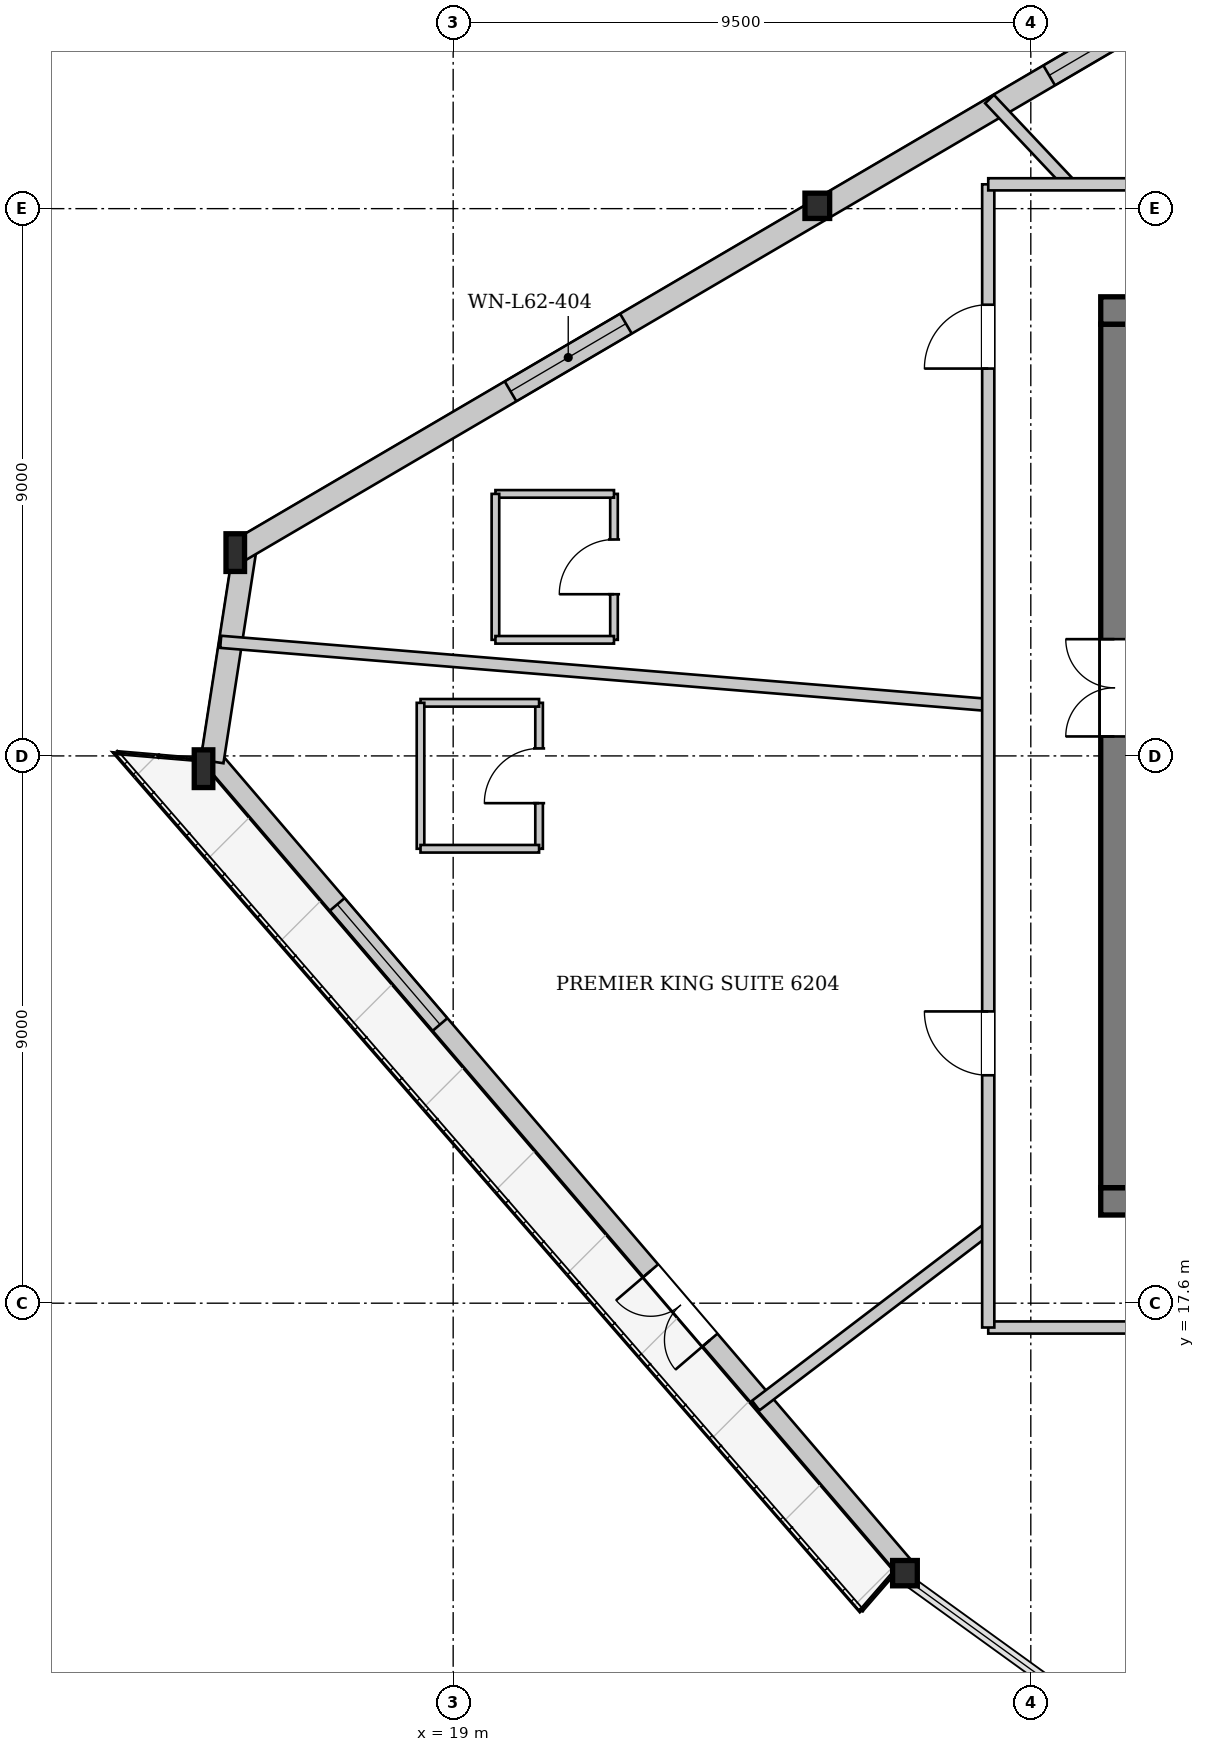
"""IFC4 building model, lengths in metres.
Left out: names, types, materials, properties, quantities, classifications, styles, units other than length and angle.
Written with IfcOpenShell. Run it as: python <this file> out.ifc"""

import sys

from ifc_helpers import new_model, si_unit, direction, frame, frame_2d, origin, origin_2d, place, context, subcontext, project, spatial, rectangle, i_section, extrude, source, transform, mapped, element, fill, save


model = new_model("IFC4")
c1 = context("Model", 3, precision=1e-05, world=origin(), true_north=direction((0.0, 1.0)))
c2 = subcontext(c1, "Body", "Model", "MODEL_VIEW")
j1 = project(units=[si_unit("LENGTHUNIT", "METRE"), si_unit("PLANEANGLEUNIT", "RADIAN")], contexts=[c1])
p1 = place(None, origin())
s1 = spatial("IfcSite", under=j1, at=p1, CompositionType="ELEMENT")
p2 = place(p1, origin())
s2 = spatial("IfcBuilding", under=s1, at=p2, CompositionType="ELEMENT")
p3 = place(p2, frame((0.0, 0.0, 234.5)))
s3 = spatial("IfcBuildingStorey", under=s2, at=p3, CompositionType="ELEMENT", Elevation=234.5)
m1 = source(origin(), c2, "Body", "SweptSolid", [
    extrude(i_section(OverallWidth=0.406, OverallDepth=0.416, WebThickness=0.027, FlangeThickness=0.042, at=origin_2d()), origin(), (0.0, 0.0, 1.0), 3.45),
])
p4 = place(p3, frame((25.031, 35.8, 0.0), z_axis=(-0.024769494454, -0.088887100096, 0.995733677035), x_axis=(0.963297826422, -0.26843490386, 0.0)))
e1 = element("IfcColumn", 1, at=p4, inside=s3, PredefinedType="COLUMN", context=c2, shape_type="MappedRepresentation", body=[
    mapped(m1, transform((0.0, 0.0, 0.0), x_axis=(1.0, 0.0, 0.0), y_axis=(0.0, 1.0, 0.0), z_axis=(0.0, 0.0, 1.0), scale=1.0)),
])
m2 = source(origin(), c2, "Body", "SweptSolid", [
    extrude(i_section(OverallWidth=0.305, OverallDepth=0.62, WebThickness=0.021, FlangeThickness=0.04, at=origin_2d()), origin(), (0.0, 0.0, 1.0), 3.461),
])
p5 = place(p3, frame((15.406, 30.154, 0.0), z_axis=(0.005925625023, -0.121757485595, 0.99254219138), x_axis=(0.998817839746, 0.048609906453, 0.0)))
e2 = element("IfcColumn", 2, at=p5, inside=s3, PredefinedType="COLUMN", context=c2, shape_type="MappedRepresentation", body=[
    mapped(m2, transform((0.0, 0.0, 0.0), x_axis=(1.0, 0.0, 0.0), y_axis=(0.0, 1.0, 0.0), z_axis=(0.0, 0.0, 1.0), scale=1.0)),
])
m3 = source(origin(), c2, "Body", "SweptSolid", [
    extrude(i_section(OverallWidth=0.305, OverallDepth=0.62, WebThickness=0.021, FlangeThickness=0.04, at=origin_2d()), origin(), (0.0, 0.0, 1.0), 3.449),
])
p6 = place(p3, frame((14.846, 26.537, 0.0), z_axis=(0.027818617963, -0.085508627226, 0.995948994259), x_axis=(0.950941466299, 0.309370857827, 0.0)))
e3 = element("IfcColumn", 3, at=p6, inside=s3, PredefinedType="COLUMN", context=c2, shape_type="MappedRepresentation", body=[
    mapped(m3, transform((0.0, 0.0, 0.0), x_axis=(1.0, 0.0, 0.0), y_axis=(0.0, 1.0, 0.0), z_axis=(0.0, 0.0, 1.0), scale=1.0)),
])
m4 = source(origin(), c2, "Body", "SweptSolid", [
    extrude(i_section(OverallWidth=0.406, OverallDepth=0.416, WebThickness=0.027, FlangeThickness=0.042, at=origin_2d()), origin(), (0.0, 0.0, 1.0), 3.45),
])
p7 = place(p3, frame((26.271, 13.19, 0.0), z_axis=(0.092200505272, -0.016982441493, 0.995595632528), x_axis=(0.181143219121, 0.983456727145, 0.0)))
e4 = element("IfcColumn", 4, at=p7, inside=s3, PredefinedType="COLUMN", context=c2, shape_type="MappedRepresentation", body=[
    mapped(m4, transform((0.0, 0.0, 0.0), x_axis=(1.0, 0.0, 0.0), y_axis=(0.0, 1.0, 0.0), z_axis=(0.0, 0.0, 1.0), scale=1.0)),
])
p8 = place(p3, frame((26.393, 13.294, 0.0), z_axis=(0.0, 0.0, 1.0), x_axis=(-0.650264813907, 0.759707622573, 0.0)))
e5 = element("IfcWall", 5, at=p8, inside=s3, PredefinedType="SOLIDWALL", context=c2, shape_type="SweptSolid", body=[
    extrude(rectangle(XDim=17.57, YDim=0.32, at=frame_2d((8.785, 0.0))), origin(), (0.0, 0.0, 1.0), 2.872),
])
p9 = place(p8, frame((4.872, 0.0, 0.0)))
e6 = element("IfcOpeningElement", 6, at=p9, cuts=e5, PredefinedType="OPENING", context=c2, shape_type="SweptSolid", body=[
    extrude(rectangle(XDim=1.5, YDim=2.3, at=frame_2d((0.75, 1.15))), frame((0.0, 0.17, 0.0), z_axis=(0.0, -1.0, 0.0), x_axis=(1.0, 0.0, 0.0)), (0.0, 0.0, 1.0), 0.34),
])
p10 = place(p8, frame((11.701, 0.0, 0.402)))
e7 = element("IfcOpeningElement", 7, at=p10, cuts=e5, PredefinedType="OPENING", context=c2, shape_type="SweptSolid", body=[
    extrude(rectangle(XDim=2.6, YDim=2.35, at=frame_2d((1.3, 1.175))), frame((0.0, 0.17, 0.0), z_axis=(0.0, -1.0, 0.0), x_axis=(1.0, 0.0, 0.0)), (0.0, 0.0, 1.0), 0.34),
])
p11 = place(p3, frame((15.034, 26.508, 0.0), z_axis=(0.0, 0.0, 1.0), x_axis=(0.152964443896, 0.988231692926, 0.0)))
e8 = element("IfcWall", 8, at=p11, inside=s3, PredefinedType="SOLIDWALL", context=c2, shape_type="SweptSolid", body=[
    extrude(rectangle(XDim=3.66, YDim=0.38, at=frame_2d((1.83, 0.0))), origin(), (0.0, 0.0, 1.0), 2.872),
])
p12 = place(p3, frame((15.502, 29.99, 0.0), z_axis=(0.0, 0.0, 1.0), x_axis=(0.862571881981, 0.505934529772, 0.0)))
e9 = element("IfcWall", 9, at=p12, inside=s3, PredefinedType="SOLIDWALL", context=c2, shape_type="SweptSolid", body=[
    extrude(rectangle(XDim=22.318, YDim=0.38, at=frame_2d((11.159, 0.0))), origin(), (0.0, 0.0, 1.0), 2.872),
])
p13 = place(p12, frame((5.149, 0.0, 0.502)))
e10 = element("IfcOpeningElement", 10, at=p13, cuts=e9, PredefinedType="OPENING", context=c2, shape_type="SweptSolid", body=[
    extrude(rectangle(XDim=2.2, YDim=2.25, at=frame_2d((1.1, 1.125))), frame((0.0, 0.2, 0.0), z_axis=(0.0, -1.0, 0.0), x_axis=(1.0, 0.0, 0.0)), (0.0, 0.0, 1.0), 0.4),
])
p14 = place(p12, frame((15.419, 0.0, 0.502)))
e11 = element("IfcOpeningElement", 11, at=p14, cuts=e9, PredefinedType="OPENING", context=c2, shape_type="SweptSolid", body=[
    extrude(rectangle(XDim=2.2, YDim=2.25, at=frame_2d((1.1, 1.125))), frame((0.0, 0.2, 0.0), z_axis=(0.0, -1.0, 0.0), x_axis=(1.0, 0.0, 0.0)), (0.0, 0.0, 1.0), 0.4),
])
p15 = place(p3, frame((46.35, 19.275, 0.0), z_axis=(0.0, 0.0, 1.0), x_axis=(-1.0, 0.0, 0.0)))
e12 = element("IfcWall", 12, at=p15, inside=s3, PredefinedType="SHEAR", context=c2, shape_type="SweptSolid", body=[
    extrude(rectangle(XDim=16.7, YDim=0.45, at=frame_2d((8.35, 0.0))), origin(), (0.0, 0.0, 1.0), 3.38),
])
p16 = place(p15, frame((4.55, 0.0, 0.0)))
e13 = element("IfcOpeningElement", 13, at=p16, cuts=e12, PredefinedType="OPENING", context=c2, shape_type="SweptSolid", body=[
    extrude(rectangle(XDim=1.12, YDim=2.25, at=frame_2d((0.56, 1.125))), frame((0.0, 0.235, 0.0), z_axis=(0.0, -1.0, 0.0), x_axis=(1.0, 0.0, 0.0)), (0.0, 0.0, 1.0), 0.47),
])
p17 = place(p15, frame((11.05, 0.0, 0.0)))
e14 = element("IfcOpeningElement", 14, at=p17, cuts=e12, PredefinedType="OPENING", context=c2, shape_type="SweptSolid", body=[
    extrude(rectangle(XDim=1.12, YDim=2.25, at=frame_2d((0.56, 1.125))), frame((0.0, 0.235, 0.0), z_axis=(0.0, -1.0, 0.0), x_axis=(1.0, 0.0, 0.0)), (0.0, 0.0, 1.0), 0.47),
])
p18 = place(p3, frame((29.875, 19.5, 0.0), z_axis=(0.0, 0.0, 1.0), x_axis=(0.0, 1.0, 0.0)))
e15 = element("IfcWall", 15, at=p18, inside=s3, PredefinedType="SHEAR", context=c2, shape_type="SweptSolid", body=[
    extrude(rectangle(XDim=14.2, YDim=0.45, at=frame_2d((7.1, 0.0))), origin(), (0.0, 0.0, 1.0), 3.38),
])
p19 = place(p18, frame((7.42, 0.0, 0.0)))
e16 = element("IfcOpeningElement", 16, at=p19, cuts=e15, PredefinedType="OPENING", context=c2, shape_type="SweptSolid", body=[
    extrude(rectangle(XDim=1.6, YDim=2.2, at=frame_2d((0.8, 1.1))), frame((0.0, 0.235, 0.0), z_axis=(0.0, -1.0, 0.0), x_axis=(1.0, 0.0, 0.0)), (0.0, 0.0, 1.0), 0.47),
])
p20 = place(p3, frame((29.65, 33.925, 0.0), z_axis=(0.0, 0.0, 1.0), x_axis=(1.0, 0.0, 0.0)))
e17 = element("IfcWall", 17, at=p20, inside=s3, PredefinedType="SHEAR", context=c2, shape_type="SweptSolid", body=[
    extrude(rectangle(XDim=16.7, YDim=0.45, at=frame_2d((8.35, 0.0))), origin(), (0.0, 0.0, 1.0), 3.38),
])
p21 = place(p20, frame((1.45, 0.0, 0.0)))
e18 = element("IfcOpeningElement", 18, at=p21, cuts=e17, PredefinedType="OPENING", context=c2, shape_type="SweptSolid", body=[
    extrude(rectangle(XDim=0.95, YDim=2.1, at=frame_2d((0.475, 1.05))), frame((0.0, 0.235, 0.0), z_axis=(0.0, -1.0, 0.0), x_axis=(1.0, 0.0, 0.0)), (0.0, 0.0, 1.0), 0.47),
])
p22 = place(p20, frame((3.83, 0.0, 0.0)))
e19 = element("IfcOpeningElement", 19, at=p22, cuts=e17, PredefinedType="OPENING", context=c2, shape_type="SweptSolid", body=[
    extrude(rectangle(XDim=1.32, YDim=2.2, at=frame_2d((0.66, 1.1))), frame((0.0, 0.235, 0.0), z_axis=(0.0, -1.0, 0.0), x_axis=(1.0, 0.0, 0.0)), (0.0, 0.0, 1.0), 0.47),
])
p23 = place(p3, frame((29.142, 36.0, 0.0), z_axis=(0.0, 0.0, 1.0), x_axis=(-0.685811478451, 0.727779235775, 0.0)))
e20 = element("IfcWall", 20, at=p23, inside=s3, PredefinedType="PARTITIONING", context=c2, shape_type="SweptSolid", body=[
    extrude(rectangle(XDim=1.926, YDim=0.2, at=frame_2d((0.963, 0.0))), origin(), (0.0, 0.0, 1.0), 3.38),
])
p24 = place(p3, frame((27.8, 27.439, 0.0), z_axis=(0.0, 0.0, 1.0), x_axis=(-0.996638842389, 0.081920802246, 0.0)))
e21 = element("IfcWall", 21, at=p24, inside=s3, PredefinedType="PARTITIONING", context=c2, shape_type="SweptSolid", body=[
    extrude(rectangle(XDim=12.666, YDim=0.2, at=frame_2d((6.333, 0.0))), origin(), (0.0, 0.0, 1.0), 3.38),
])
p25 = place(p3, frame((27.8, 18.83, 0.0), z_axis=(0.0, 0.0, 1.0), x_axis=(-0.795504003678, -0.60594833124, 0.0)))
e22 = element("IfcWall", 22, at=p25, inside=s3, PredefinedType="PARTITIONING", context=c2, shape_type="SweptSolid", body=[
    extrude(rectangle(XDim=4.807, YDim=0.2, at=frame_2d((2.403, 0.0))), origin(), (0.0, 0.0, 1.0), 3.38),
])
p26 = place(p3, frame((21.645, 28.509, 0.0), z_axis=(0.0, 0.0, 1.0), x_axis=(0.0, 1.0, 0.0)))
e23 = element("IfcWall", 23, at=p26, inside=s3, PredefinedType="PARTITIONING", context=c2, shape_type="SweptSolid", body=[
    extrude(rectangle(XDim=2.4, YDim=0.125, at=frame_2d((1.2, 0.0))), origin(), (0.0, 0.0, 1.0), 3.38),
])
p27 = place(p26, frame((0.75, 0.0, 0.0)))
e24 = element("IfcOpeningElement", 24, at=p27, cuts=e23, PredefinedType="OPENING", context=c2, shape_type="SweptSolid", body=[
    extrude(rectangle(XDim=0.9, YDim=2.1, at=frame_2d((0.45, 1.05))), frame((0.0, 0.073, 0.0), z_axis=(0.0, -1.0, 0.0), x_axis=(1.0, 0.0, 0.0)), (0.0, 0.0, 1.0), 0.145),
])
p28 = place(p3, frame((21.645, 30.909, 0.0), z_axis=(0.0, 0.0, 1.0), x_axis=(-1.0, 0.0, 0.0)))
e25 = element("IfcWall", 25, at=p28, inside=s3, PredefinedType="PARTITIONING", context=c2, shape_type="SweptSolid", body=[
    extrude(rectangle(XDim=1.95, YDim=0.125, at=frame_2d((0.975, 0.0))), origin(), (0.0, 0.0, 1.0), 3.38),
])
p29 = place(p3, frame((19.695, 30.909, 0.0), z_axis=(0.0, 0.0, 1.0), x_axis=(0.0, -1.0, 0.0)))
e26 = element("IfcWall", 26, at=p29, inside=s3, PredefinedType="PARTITIONING", context=c2, shape_type="SweptSolid", body=[
    extrude(rectangle(XDim=2.4, YDim=0.125, at=frame_2d((1.2, 0.0))), origin(), (0.0, 0.0, 1.0), 3.38),
])
p30 = place(p3, frame((19.695, 28.509, 0.0), z_axis=(0.0, 0.0, 1.0), x_axis=(1.0, 0.0, 0.0)))
e27 = element("IfcWall", 27, at=p30, inside=s3, PredefinedType="PARTITIONING", context=c2, shape_type="SweptSolid", body=[
    extrude(rectangle(XDim=1.95, YDim=0.125, at=frame_2d((0.975, 0.0))), origin(), (0.0, 0.0, 1.0), 3.38),
])
p31 = place(p3, frame((20.413, 25.073, 0.0), z_axis=(0.0, 0.0, 1.0), x_axis=(0.0, 1.0, 0.0)))
e28 = element("IfcWall", 28, at=p31, inside=s3, PredefinedType="PARTITIONING", context=c2, shape_type="SweptSolid", body=[
    extrude(rectangle(XDim=2.4, YDim=0.125, at=frame_2d((1.2, 0.0))), origin(), (0.0, 0.0, 1.0), 3.38),
])
p32 = place(p31, frame((0.75, 0.0, 0.0)))
e29 = element("IfcOpeningElement", 29, at=p32, cuts=e28, PredefinedType="OPENING", context=c2, shape_type="SweptSolid", body=[
    extrude(rectangle(XDim=0.9, YDim=2.1, at=frame_2d((0.45, 1.05))), frame((0.0, 0.073, 0.0), z_axis=(0.0, -1.0, 0.0), x_axis=(1.0, 0.0, 0.0)), (0.0, 0.0, 1.0), 0.145),
])
p33 = place(p3, frame((20.413, 27.473, 0.0), z_axis=(0.0, 0.0, 1.0), x_axis=(-1.0, 0.0, 0.0)))
e30 = element("IfcWall", 30, at=p33, inside=s3, PredefinedType="PARTITIONING", context=c2, shape_type="SweptSolid", body=[
    extrude(rectangle(XDim=1.95, YDim=0.125, at=frame_2d((0.975, 0.0))), origin(), (0.0, 0.0, 1.0), 3.38),
])
p34 = place(p3, frame((18.463, 27.473, 0.0), z_axis=(0.0, 0.0, 1.0), x_axis=(0.0, -1.0, 0.0)))
e31 = element("IfcWall", 31, at=p34, inside=s3, PredefinedType="PARTITIONING", context=c2, shape_type="SweptSolid", body=[
    extrude(rectangle(XDim=2.4, YDim=0.125, at=frame_2d((1.2, 0.0))), origin(), (0.0, 0.0, 1.0), 3.38),
])
p35 = place(p3, frame((18.463, 25.073, 0.0), z_axis=(0.0, 0.0, 1.0), x_axis=(1.0, 0.0, 0.0)))
e32 = element("IfcWall", 32, at=p35, inside=s3, PredefinedType="PARTITIONING", context=c2, shape_type="SweptSolid", body=[
    extrude(rectangle(XDim=1.95, YDim=0.125, at=frame_2d((0.975, 0.0))), origin(), (0.0, 0.0, 1.0), 3.38),
])
p36 = place(p3, frame((27.8, 17.2, 0.0), z_axis=(0.0, 0.0, 1.0), x_axis=(1.0, 0.0, 0.0)))
e33 = element("IfcWall", 33, at=p36, inside=s3, PredefinedType="PARTITIONING", context=c2, shape_type="SweptSolid", body=[
    extrude(rectangle(XDim=20.4, YDim=0.2, at=frame_2d((10.2, 0.0))), origin(), (0.0, 0.0, 1.0), 3.38),
])
p37 = place(p36, frame((7.636, 0.0, 0.0)))
e34 = element("IfcOpeningElement", 34, at=p37, cuts=e33, PredefinedType="OPENING", context=c2, shape_type="SweptSolid", body=[
    extrude(rectangle(XDim=1.05, YDim=2.2, at=frame_2d((0.525, 1.1))), frame((0.0, 0.11, 0.0), z_axis=(0.0, -1.0, 0.0), x_axis=(1.0, 0.0, 0.0)), (0.0, 0.0, 1.0), 0.22),
])
p38 = place(p36, frame((14.345, 0.0, 0.0)))
e35 = element("IfcOpeningElement", 35, at=p38, cuts=e33, PredefinedType="OPENING", context=c2, shape_type="SweptSolid", body=[
    extrude(rectangle(XDim=1.05, YDim=2.2, at=frame_2d((0.525, 1.1))), frame((0.0, 0.11, 0.0), z_axis=(0.0, -1.0, 0.0), x_axis=(1.0, 0.0, 0.0)), (0.0, 0.0, 1.0), 0.22),
])
p39 = place(p3, frame((27.8, 17.2, 0.0), z_axis=(0.0, 0.0, 1.0), x_axis=(0.0, 1.0, 0.0)))
e36 = element("IfcWall", 36, at=p39, inside=s3, PredefinedType="PARTITIONING", context=c2, shape_type="SweptSolid", body=[
    extrude(rectangle(XDim=18.8, YDim=0.2, at=frame_2d((9.4, 0.0))), origin(), (0.0, 0.0, 1.0), 3.38),
])
p40 = place(p39, frame((15.77, 0.0, 0.0)))
e37 = element("IfcOpeningElement", 37, at=p40, cuts=e36, PredefinedType="OPENING", context=c2, shape_type="SweptSolid", body=[
    extrude(rectangle(XDim=1.05, YDim=2.2, at=frame_2d((0.525, 1.1))), frame((0.0, 0.11, 0.0), z_axis=(0.0, -1.0, 0.0), x_axis=(1.0, 0.0, 0.0)), (0.0, 0.0, 1.0), 0.22),
])
p41 = place(p39, frame((4.148, 0.0, 0.0)))
e38 = element("IfcOpeningElement", 38, at=p41, cuts=e36, PredefinedType="OPENING", context=c2, shape_type="SweptSolid", body=[
    extrude(rectangle(XDim=1.05, YDim=2.2, at=frame_2d((0.525, 1.1))), frame((0.0, 0.11, 0.0), z_axis=(0.0, -1.0, 0.0), x_axis=(1.0, 0.0, 0.0)), (0.0, 0.0, 1.0), 0.22),
])
p42 = place(p3, frame((27.8, 36.0, 0.0), z_axis=(0.0, 0.0, 1.0), x_axis=(1.0, 0.0, 0.0)))
e39 = element("IfcWall", 39, at=p42, inside=s3, PredefinedType="PARTITIONING", context=c2, shape_type="SweptSolid", body=[
    extrude(rectangle(XDim=13.2, YDim=0.2, at=frame_2d((6.6, 0.0))), origin(), (0.0, 0.0, 1.0), 3.38),
])
p43 = place(p42, frame((3.983, 0.0, 0.0)))
e40 = element("IfcOpeningElement", 40, at=p43, cuts=e39, PredefinedType="OPENING", context=c2, shape_type="SweptSolid", body=[
    extrude(rectangle(XDim=1.05, YDim=2.2, at=frame_2d((0.525, 1.1))), frame((0.0, 0.11, 0.0), z_axis=(0.0, -1.0, 0.0), x_axis=(1.0, 0.0, 0.0)), (0.0, 0.0, 1.0), 0.22),
])
m5 = source(origin(), c2, "Body", "SweptSolid", [
    extrude(rectangle(XDim=1.5, YDim=2.3, at=frame_2d((0.75, 1.15))), frame((0.0, 0.025, 0.0), z_axis=(0.0, -1.0, 0.0), x_axis=(1.0, 0.0, 0.0)), (0.0, 0.0, 1.0), 0.05),
])
p44 = place(p9, origin())
e41 = element("IfcDoor", 41, at=p44, inside=s3, OperationType="DOUBLE_DOOR_SINGLE_SWING", PredefinedType="DOOR", context=c2, shape_type="MappedRepresentation", body=[
    mapped(m5, transform((0.0, 0.0, 0.0), x_axis=(1.0, 0.0, 0.0), y_axis=(0.0, 1.0, 0.0), z_axis=(0.0, 0.0, 1.0), scale=1.0)),
])
fill(e6, e41)
m6 = source(origin(), c2, "Body", "SweptSolid", [
    extrude(rectangle(XDim=2.6, YDim=2.35, at=frame_2d((1.3, 1.175))), frame((0.0, 0.03, 0.0), z_axis=(0.0, -1.0, 0.0), x_axis=(1.0, 0.0, 0.0)), (0.0, 0.0, 1.0), 0.06),
])
p45 = place(p10, origin())
e42 = element("IfcWindow", 42, at=p45, inside=s3, PartitioningType="SINGLE_PANEL", PredefinedType="WINDOW", context=c2, shape_type="MappedRepresentation", body=[
    mapped(m6, transform((0.0, 0.0, 0.0), x_axis=(1.0, 0.0, 0.0), y_axis=(0.0, 1.0, 0.0), z_axis=(0.0, 0.0, 1.0), scale=1.0)),
])
fill(e7, e42)
m7 = source(origin(), c2, "Body", "SweptSolid", [
    extrude(rectangle(XDim=2.2, YDim=2.25, at=frame_2d((1.1, 1.125))), frame((0.0, 0.03, 0.0), z_axis=(0.0, -1.0, 0.0), x_axis=(1.0, 0.0, 0.0)), (0.0, 0.0, 1.0), 0.06),
])
p46 = place(p13, origin())
e43 = element("IfcWindow", 43, at=p46, inside=s3, PartitioningType="SINGLE_PANEL", PredefinedType="WINDOW", context=c2, shape_type="MappedRepresentation", body=[
    mapped(m7, transform((0.0, 0.0, 0.0), x_axis=(1.0, 0.0, 0.0), y_axis=(0.0, 1.0, 0.0), z_axis=(0.0, 0.0, 1.0), scale=1.0)),
])
fill(e10, e43)
p47 = place(p14, origin())
e44 = element("IfcWindow", 44, at=p47, inside=s3, PartitioningType="SINGLE_PANEL", PredefinedType="WINDOW", context=c2, shape_type="MappedRepresentation", body=[
    mapped(m7, transform((0.0, 0.0, 0.0), x_axis=(1.0, 0.0, 0.0), y_axis=(0.0, 1.0, 0.0), z_axis=(0.0, 0.0, 1.0), scale=1.0)),
])
fill(e11, e44)
m8 = source(origin(), c2, "Body", "SweptSolid", [
    extrude(rectangle(XDim=1.6, YDim=2.2, at=frame_2d((0.8, 1.1))), frame((0.0, 0.025, 0.0), z_axis=(0.0, -1.0, 0.0), x_axis=(1.0, 0.0, 0.0)), (0.0, 0.0, 1.0), 0.05),
])
p48 = place(p19, origin())
e45 = element("IfcDoor", 45, at=p48, inside=s3, OperationType="DOUBLE_DOOR_SINGLE_SWING", PredefinedType="DOOR", context=c2, shape_type="MappedRepresentation", body=[
    mapped(m8, transform((0.0, 0.0, 0.0), x_axis=(1.0, 0.0, 0.0), y_axis=(0.0, 1.0, 0.0), z_axis=(0.0, 0.0, 1.0), scale=1.0)),
])
fill(e16, e45)
m9 = source(origin(), c2, "Body", "SweptSolid", [
    extrude(rectangle(XDim=0.9, YDim=2.1, at=frame_2d((0.45, 1.05))), frame((0.0, 0.025, 0.0), z_axis=(0.0, -1.0, 0.0), x_axis=(1.0, 0.0, 0.0)), (0.0, 0.0, 1.0), 0.05),
])
p49 = place(p27, origin())
e46 = element("IfcDoor", 46, at=p49, inside=s3, OperationType="SINGLE_SWING_LEFT", PredefinedType="DOOR", context=c2, shape_type="MappedRepresentation", body=[
    mapped(m9, transform((0.0, 0.0, 0.0), x_axis=(1.0, 0.0, 0.0), y_axis=(0.0, 1.0, 0.0), z_axis=(0.0, 0.0, 1.0), scale=1.0)),
])
fill(e24, e46)
p50 = place(p32, origin())
e47 = element("IfcDoor", 47, at=p50, inside=s3, OperationType="SINGLE_SWING_LEFT", PredefinedType="DOOR", context=c2, shape_type="MappedRepresentation", body=[
    mapped(m9, transform((0.0, 0.0, 0.0), x_axis=(1.0, 0.0, 0.0), y_axis=(0.0, 1.0, 0.0), z_axis=(0.0, 0.0, 1.0), scale=1.0)),
])
fill(e29, e47)
m10 = source(origin(), c2, "Body", "SweptSolid", [
    extrude(rectangle(XDim=1.05, YDim=2.2, at=frame_2d((0.525, 1.1))), frame((0.0, 0.025, 0.0), z_axis=(0.0, -1.0, 0.0), x_axis=(1.0, 0.0, 0.0)), (0.0, 0.0, 1.0), 0.05),
])
p51 = place(p40, origin())
e48 = element("IfcDoor", 48, at=p51, inside=s3, OperationType="SINGLE_SWING_LEFT", PredefinedType="DOOR", context=c2, shape_type="MappedRepresentation", body=[
    mapped(m10, transform((0.0, 0.0, 0.0), x_axis=(1.0, 0.0, 0.0), y_axis=(0.0, 1.0, 0.0), z_axis=(0.0, 0.0, 1.0), scale=1.0)),
])
fill(e37, e48)
p52 = place(p41, origin())
e49 = element("IfcDoor", 49, at=p52, inside=s3, OperationType="SINGLE_SWING_RIGHT", PredefinedType="DOOR", context=c2, shape_type="MappedRepresentation", body=[
    mapped(m10, transform((0.0, 0.0, 0.0), x_axis=(1.0, 0.0, 0.0), y_axis=(0.0, 1.0, 0.0), z_axis=(0.0, 0.0, 1.0), scale=1.0)),
])
fill(e38, e49)
save(model, sys.argv[1])
